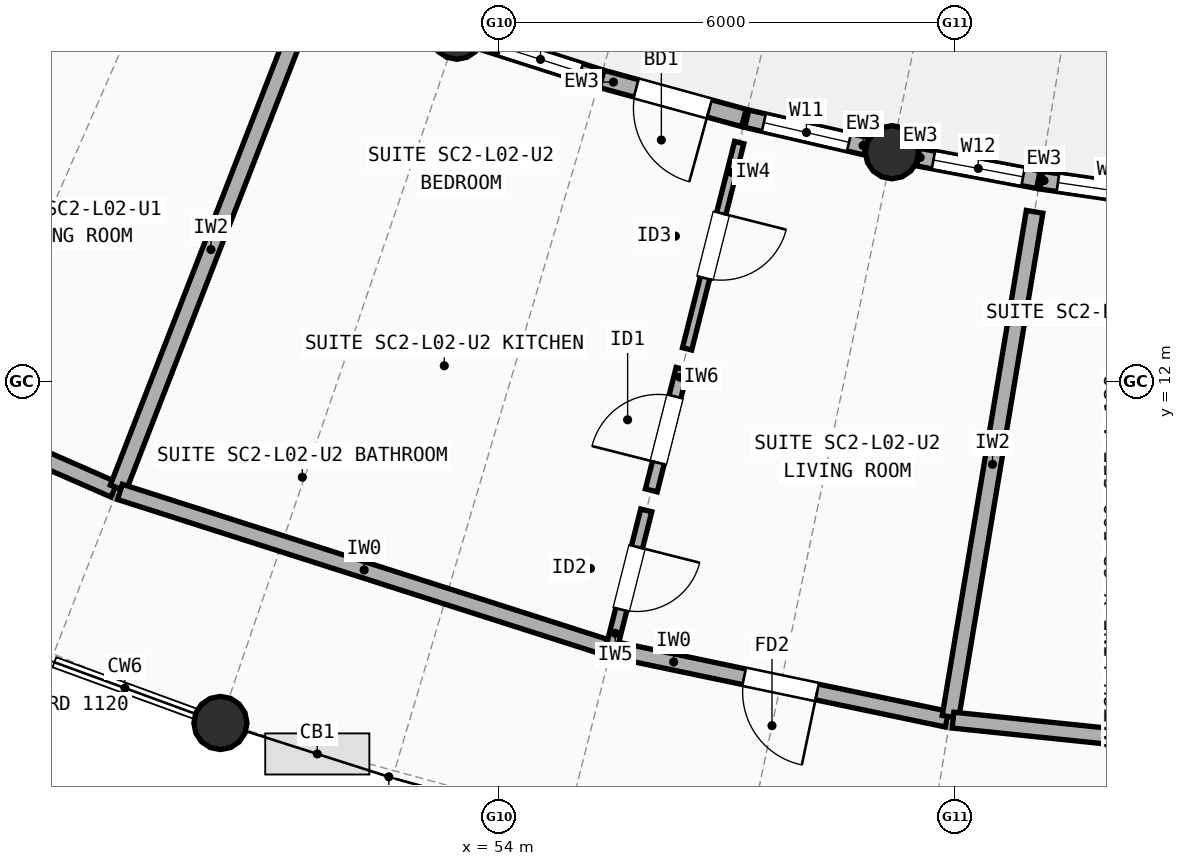
"""IFC4 building model, lengths in metres.
Left out: names, types, materials, properties, quantities, classifications, styles, units other than length and angle.
Written with IfcOpenShell. Run it as: python <this file> out.ifc"""

import sys

from ifc_helpers import new_model, si_unit, direction, frame, frame_2d, origin, origin_2d, place, context, subcontext, project, spatial, rectangle, circle, extrude, element, fill, save


model = new_model("IFC4")
c1 = context("Model", 3, precision=1e-05, world=origin(), true_north=direction((0.0, 1.0)))
c2 = subcontext(c1, "Body", "Model", "MODEL_VIEW")
j1 = project(units=[si_unit("LENGTHUNIT", "METRE"), si_unit("PLANEANGLEUNIT", "RADIAN")], contexts=[c1])
p1 = place(None, origin())
s1 = spatial("IfcSite", under=j1, at=p1, CompositionType="ELEMENT")
p2 = place(p1, origin())
s2 = spatial("IfcBuilding", under=s1, at=p2, CompositionType="ELEMENT")
p3 = place(p2, frame((0.0, 0.0, 7.7)))
s3 = spatial("IfcBuildingStorey", under=s2, at=p3, CompositionType="ELEMENT", Elevation=7.7)
for number, where, z_axis, x_axis in (
    (1, (53.445, 16.59, 0.0), (0.0, 0.0, 1.0), (1.0, 0.0, 0.0)),
    (2, (50.334, 7.508, 0.0), (0.0, 0.0, 1.0), (1.0, 0.0, 0.0)),
    (3, (59.169, 15.018, 0.0), (0.0, 0.0, 1.0), (1.0, 0.0, 0.0)),
):
    element("IfcColumn", number, at=place(p3, frame(where, z_axis=z_axis, x_axis=x_axis)), inside=s3, PredefinedType="COLUMN", context=c2, shape_type="SweptSolid", body=[
        extrude(circle(Radius=0.35, at=origin_2d()), origin(), (0.0, 0.0, 1.0), 2.948),
    ])
p4 = place(p3, frame((53.778, 16.484, 0.0), z_axis=(0.0, 0.0, 1.0), x_axis=(0.952508629145, -0.304511594861, 0.0)))
e4 = element("IfcWall", 4, at=p4, inside=s3, PredefinedType="STANDARD", context=c2, shape_type="SweptSolid", body=[
    extrude(rectangle(XDim=1.61, YDim=0.235, at=frame_2d((0.805, 0.0))), origin(), (0.0, 0.0, 1.0), 2.684),
])
p5 = place(p4, frame((0.255, 0.0, 0.85)))
e5 = element("IfcOpeningElement", 5, at=p5, cuts=e4, PredefinedType="OPENING", context=c2, shape_type="SweptSolid", body=[
    extrude(rectangle(XDim=1.1, YDim=1.45, at=frame_2d((0.55, 0.725))), frame((0.0, 0.127, 0.0), z_axis=(0.0, -1.0, 0.0), x_axis=(1.0, 0.0, 0.0)), (0.0, 0.0, 1.0), 0.255),
])
p6 = place(p3, frame((55.35, 15.982, 0.0), z_axis=(0.0, 0.0, 1.0), x_axis=(0.964271323293, -0.264916619098, 0.0)))
e6 = element("IfcWall", 6, at=p6, inside=s3, PredefinedType="STANDARD", context=c2, shape_type="SweptSolid", body=[
    extrude(rectangle(XDim=1.94, YDim=0.235, at=frame_2d((0.97, 0.0))), origin(), (0.0, 0.0, 1.0), 2.684),
])
p7 = place(p6, frame((0.47, 0.0, 0.0)))
e7 = element("IfcOpeningElement", 7, at=p7, cuts=e6, PredefinedType="OPENING", context=c2, shape_type="SweptSolid", body=[
    extrude(rectangle(XDim=1.0, YDim=2.15, at=frame_2d((0.5, 1.075))), frame((0.0, 0.127, 0.0), z_axis=(0.0, -1.0, 0.0), x_axis=(1.0, 0.0, 0.0)), (0.0, 0.0, 1.0), 0.255),
])
p8 = place(p3, frame((57.26, 15.458, 0.0), z_axis=(0.0, 0.0, 1.0), x_axis=(0.974355406192, -0.225014538249, 0.0)))
e8 = element("IfcWall", 8, at=p8, inside=s3, PredefinedType="STANDARD", context=c2, shape_type="SweptSolid", body=[
    extrude(rectangle(XDim=1.61, YDim=0.235, at=frame_2d((0.805, 0.0))), origin(), (0.0, 0.0, 1.0), 2.684),
])
p9 = place(p8, frame((0.23, 0.0, 0.85)))
e9 = element("IfcOpeningElement", 9, at=p9, cuts=e8, PredefinedType="OPENING", context=c2, shape_type="SweptSolid", body=[
    extrude(rectangle(XDim=1.15, YDim=1.45, at=frame_2d((0.575, 0.725))), frame((0.0, 0.127, 0.0), z_axis=(0.0, -1.0, 0.0), x_axis=(1.0, 0.0, 0.0)), (0.0, 0.0, 1.0), 0.255),
])
p10 = place(p3, frame((59.513, 14.953, 0.0), z_axis=(0.0, 0.0, 1.0), x_axis=(0.982827529128, -0.184526550902, 0.0)))
e10 = element("IfcWall", 10, at=p10, inside=s3, PredefinedType="STANDARD", context=c2, shape_type="SweptSolid", body=[
    extrude(rectangle(XDim=1.61, YDim=0.235, at=frame_2d((0.805, 0.0))), origin(), (0.0, 0.0, 1.0), 2.684),
])
p11 = place(p10, frame((0.205, 0.0, 0.85)))
e11 = element("IfcOpeningElement", 11, at=p11, cuts=e10, PredefinedType="OPENING", context=c2, shape_type="SweptSolid", body=[
    extrude(rectangle(XDim=1.2, YDim=1.35, at=frame_2d((0.6, 0.675))), frame((0.0, 0.127, 0.0), z_axis=(0.0, -1.0, 0.0), x_axis=(1.0, 0.0, 0.0)), (0.0, 0.0, 1.0), 0.255),
])
p12 = place(p3, frame((61.135, 14.649, 0.0), z_axis=(0.0, 0.0, 1.0), x_axis=(0.989601751146, -0.14383453733, 0.0)))
e12 = element("IfcWall", 12, at=p12, inside=s3, PredefinedType="STANDARD", context=c2, shape_type="SweptSolid", body=[
    extrude(rectangle(XDim=1.94, YDim=0.235, at=frame_2d((0.97, 0.0))), origin(), (0.0, 0.0, 1.0), 2.684),
])
p13 = place(p12, frame((0.22, 0.0, 0.85)))
e13 = element("IfcOpeningElement", 13, at=p13, cuts=e12, PredefinedType="OPENING", context=c2, shape_type="SweptSolid", body=[
    extrude(rectangle(XDim=1.5, YDim=1.4, at=frame_2d((0.75, 0.7))), frame((0.0, 0.127, 0.0), z_axis=(0.0, -1.0, 0.0), x_axis=(1.0, 0.0, 0.0)), (0.0, 0.0, 1.0), 0.255),
])
p14 = place(p3, frame((44.838, 12.371, 0.0), z_axis=(0.0, 0.0, 1.0), x_axis=(0.91610596958, -0.40093621999, 0.0)))
e14 = element("IfcWall", 14, at=p14, inside=s3, PredefinedType="SOLIDWALL", context=c2, shape_type="SweptSolid", body=[
    extrude(rectangle(XDim=4.473, YDim=0.21, at=frame_2d((2.237, 0.0))), origin(), (0.0, 0.0, 1.0), 2.762),
])
p15 = place(p14, frame((1.737, 0.0, 0.0)))
e15 = element("IfcOpeningElement", 15, at=p15, cuts=e14, PredefinedType="OPENING", context=c2, shape_type="SweptSolid", body=[
    extrude(rectangle(XDim=1.0, YDim=2.15, at=frame_2d((0.5, 1.075))), frame((0.0, 0.115, 0.0), z_axis=(0.0, -1.0, 0.0), x_axis=(1.0, 0.0, 0.0)), (0.0, 0.0, 1.0), 0.23),
])
p16 = place(p3, frame((51.431, 16.875, 0.0), z_axis=(0.0, 0.0, 1.0), x_axis=(-0.362801288891, -0.931866527341, 0.0)))
e16 = element("IfcWall", 16, at=p16, inside=s3, PredefinedType="SOLIDWALL", context=c2, shape_type="SweptSolid", body=[
    extrude(rectangle(XDim=6.736, YDim=0.22, at=frame_2d((3.368, 0.0))), origin(), (0.0, 0.0, 1.0), 2.722),
])
p17 = place(p3, frame((49.011, 10.549, 0.0), z_axis=(0.0, 0.0, 1.0), x_axis=(0.952529122406, -0.304447484746, 0.0)))
e17 = element("IfcWall", 17, at=p17, inside=s3, PredefinedType="SOLIDWALL", context=c2, shape_type="SweptSolid", body=[
    extrude(rectangle(XDim=6.747, YDim=0.21, at=frame_2d((3.374, 0.0))), origin(), (0.0, 0.0, 1.0), 2.742),
])
p18 = place(p3, frame((55.515, 8.474, 0.0), z_axis=(0.0, 0.0, 1.0), x_axis=(0.978806148413, -0.204788973894, 0.0)))
e18 = element("IfcWall", 18, at=p18, inside=s3, PredefinedType="SOLIDWALL", context=c2, shape_type="SweptSolid", body=[
    extrude(rectangle(XDim=4.473, YDim=0.21, at=frame_2d((2.236, 0.0))), origin(), (0.0, 0.0, 1.0), 2.742),
])
p19 = place(p18, frame((1.747, 0.0, 0.0)))
e19 = element("IfcOpeningElement", 19, at=p19, cuts=e18, PredefinedType="OPENING", context=c2, shape_type="SweptSolid", body=[
    extrude(rectangle(XDim=0.98, YDim=2.15, at=frame_2d((0.49, 1.075))), frame((0.0, 0.115, 0.0), z_axis=(0.0, -1.0, 0.0), x_axis=(1.0, 0.0, 0.0)), (0.0, 0.0, 1.0), 0.23),
])
p20 = place(p3, frame((57.16, 15.145, 0.0), z_axis=(0.0, 0.0, 1.0), x_axis=(-0.245017317517, -0.969518702304, 0.0)))
e20 = element("IfcWall", 20, at=p20, inside=s3, PredefinedType="PARTITIONING", context=c2, shape_type="SweptSolid", body=[
    extrude(rectangle(XDim=2.8, YDim=0.125, at=frame_2d((1.4, 0.0))), origin(), (0.0, 0.0, 1.0), 2.722),
])
p21 = place(p20, frame((0.96, 0.0, 0.0)))
e21 = element("IfcOpeningElement", 21, at=p21, cuts=e20, PredefinedType="OPENING", context=c2, shape_type="SweptSolid", body=[
    extrude(rectangle(XDim=0.88, YDim=2.1, at=frame_2d((0.44, 1.05))), frame((0.0, 0.073, 0.0), z_axis=(0.0, -1.0, 0.0), x_axis=(1.0, 0.0, 0.0)), (0.0, 0.0, 1.0), 0.145),
])
p22 = place(p3, frame((56.407, 12.167, 0.0), z_axis=(0.0, 0.0, 1.0), x_axis=(-0.245044695728, -0.969511782855, 0.0)))
e22 = element("IfcWall", 22, at=p22, inside=s3, PredefinedType="PLUMBINGWALL", context=c2, shape_type="SweptSolid", body=[
    extrude(rectangle(XDim=1.648, YDim=0.16, at=frame_2d((0.824, 0.0))), origin(), (0.0, 0.0, 1.0), 2.722),
])
p23 = place(p22, frame((0.374, 0.0, 0.0)))
e23 = element("IfcOpeningElement", 23, at=p23, cuts=e22, PredefinedType="OPENING", context=c2, shape_type="SweptSolid", body=[
    extrude(rectangle(XDim=0.9, YDim=2.1, at=frame_2d((0.45, 1.05))), frame((0.0, 0.09, 0.0), z_axis=(0.0, -1.0, 0.0), x_axis=(1.0, 0.0, 0.0)), (0.0, 0.0, 1.0), 0.18),
])
p24 = place(p3, frame((55.937, 10.305, 0.0), z_axis=(0.0, 0.0, 1.0), x_axis=(-0.24497035727, -0.969530568914, 0.0)))
e24 = element("IfcWall", 24, at=p24, inside=s3, PredefinedType="PARTITIONING", context=c2, shape_type="SweptSolid", body=[
    extrude(rectangle(XDim=1.84, YDim=0.15, at=frame_2d((0.92, 0.0))), origin(), (0.0, 0.0, 1.0), 2.722),
])
p25 = place(p24, frame((0.495, 0.0, 0.0)))
e25 = element("IfcOpeningElement", 25, at=p25, cuts=e24, PredefinedType="OPENING", context=c2, shape_type="SweptSolid", body=[
    extrude(rectangle(XDim=0.85, YDim=2.1, at=frame_2d((0.425, 1.05))), frame((0.0, 0.085, 0.0), z_axis=(0.0, -1.0, 0.0), x_axis=(1.0, 0.0, 0.0)), (0.0, 0.0, 1.0), 0.17),
])
p26 = place(p3, frame((61.046, 14.234, 0.0), z_axis=(0.0, 0.0, 1.0), x_axis=(-0.164263800505, -0.986416445445, 0.0)))
e26 = element("IfcWall", 26, at=p26, inside=s3, PredefinedType="SOLIDWALL", context=c2, shape_type="SweptSolid", body=[
    extrude(rectangle(XDim=6.736, YDim=0.22, at=frame_2d((3.368, 0.0))), origin(), (0.0, 0.0, 1.0), 2.762),
])
p27 = place(p3, frame((59.972, 7.546, 0.0), z_axis=(0.0, 0.0, 1.0), x_axis=(0.994686939686, -0.10294606364, 0.0)))
e27 = element("IfcWall", 27, at=p27, inside=s3, PredefinedType="SOLIDWALL", context=c2, shape_type="SweptSolid", body=[
    extrude(rectangle(XDim=6.747, YDim=0.21, at=frame_2d((3.374, 0.0))), origin(), (0.0, 0.0, 1.0), 2.722),
])
p28 = place(p5, origin())
e28 = element("IfcWindow", 28, at=p28, inside=s3, PartitioningType="SINGLE_PANEL", PredefinedType="WINDOW", context=c2, shape_type="SweptSolid", body=[
    extrude(rectangle(XDim=1.1, YDim=1.45, at=frame_2d((0.55, 0.725))), frame((0.0, 0.03, 0.0), z_axis=(0.0, -1.0, 0.0), x_axis=(1.0, 0.0, 0.0)), (0.0, 0.0, 1.0), 0.06),
])
fill(e5, e28)
p29 = place(p7, origin())
e29 = element("IfcDoor", 29, at=p29, inside=s3, OperationType="SINGLE_SWING_RIGHT", PredefinedType="DOOR", context=c2, shape_type="SweptSolid", body=[
    extrude(rectangle(XDim=1.0, YDim=2.15, at=frame_2d((0.5, 1.075))), frame((0.0, 0.025, 0.0), z_axis=(0.0, -1.0, 0.0), x_axis=(1.0, 0.0, 0.0)), (0.0, 0.0, 1.0), 0.05),
])
fill(e7, e29)
p30 = place(p9, origin())
e30 = element("IfcWindow", 30, at=p30, inside=s3, PartitioningType="SINGLE_PANEL", PredefinedType="WINDOW", context=c2, shape_type="SweptSolid", body=[
    extrude(rectangle(XDim=1.15, YDim=1.45, at=frame_2d((0.575, 0.725))), frame((0.0, 0.03, 0.0), z_axis=(0.0, -1.0, 0.0), x_axis=(1.0, 0.0, 0.0)), (0.0, 0.0, 1.0), 0.06),
])
fill(e9, e30)
p31 = place(p11, origin())
e31 = element("IfcWindow", 31, at=p31, inside=s3, PartitioningType="SINGLE_PANEL", PredefinedType="WINDOW", context=c2, shape_type="SweptSolid", body=[
    extrude(rectangle(XDim=1.2, YDim=1.35, at=frame_2d((0.6, 0.675))), frame((0.0, 0.03, 0.0), z_axis=(0.0, -1.0, 0.0), x_axis=(1.0, 0.0, 0.0)), (0.0, 0.0, 1.0), 0.06),
])
fill(e11, e31)
p32 = place(p13, origin())
e32 = element("IfcWindow", 32, at=p32, inside=s3, PartitioningType="SINGLE_PANEL", PredefinedType="WINDOW", context=c2, shape_type="SweptSolid", body=[
    extrude(rectangle(XDim=1.5, YDim=1.4, at=frame_2d((0.75, 0.7))), frame((0.0, 0.03, 0.0), z_axis=(0.0, -1.0, 0.0), x_axis=(1.0, 0.0, 0.0)), (0.0, 0.0, 1.0), 0.06),
])
fill(e13, e32)
p33 = place(p19, origin())
e33 = element("IfcDoor", 33, at=p33, inside=s3, OperationType="SINGLE_SWING_RIGHT", PredefinedType="DOOR", context=c2, shape_type="SweptSolid", body=[
    extrude(rectangle(XDim=0.98, YDim=2.15, at=frame_2d((0.49, 1.075))), frame((0.0, 0.025, 0.0), z_axis=(0.0, -1.0, 0.0), x_axis=(1.0, 0.0, 0.0)), (0.0, 0.0, 1.0), 0.05),
])
fill(e19, e33)
p34 = place(p21, origin())
e34 = element("IfcDoor", 34, at=p34, inside=s3, OperationType="SINGLE_SWING_LEFT", PredefinedType="DOOR", context=c2, shape_type="SweptSolid", body=[
    extrude(rectangle(XDim=0.88, YDim=2.1, at=frame_2d((0.44, 1.05))), frame((0.0, 0.025, 0.0), z_axis=(0.0, -1.0, 0.0), x_axis=(1.0, 0.0, 0.0)), (0.0, 0.0, 1.0), 0.05),
])
fill(e21, e34)
p35 = place(p23, origin())
e35 = element("IfcDoor", 35, at=p35, inside=s3, OperationType="SINGLE_SWING_RIGHT", PredefinedType="DOOR", context=c2, shape_type="SweptSolid", body=[
    extrude(rectangle(XDim=0.9, YDim=2.1, at=frame_2d((0.45, 1.05))), frame((0.0, 0.025, 0.0), z_axis=(0.0, -1.0, 0.0), x_axis=(1.0, 0.0, 0.0)), (0.0, 0.0, 1.0), 0.05),
])
fill(e23, e35)
p36 = place(p25, origin())
e36 = element("IfcDoor", 36, at=p36, inside=s3, OperationType="SINGLE_SWING_LEFT", PredefinedType="DOOR", context=c2, shape_type="SweptSolid", body=[
    extrude(rectangle(XDim=0.85, YDim=2.1, at=frame_2d((0.425, 1.05))), frame((0.0, 0.025, 0.0), z_axis=(0.0, -1.0, 0.0), x_axis=(1.0, 0.0, 0.0)), (0.0, 0.0, 1.0), 0.05),
])
fill(e25, e36)
save(model, sys.argv[1])
